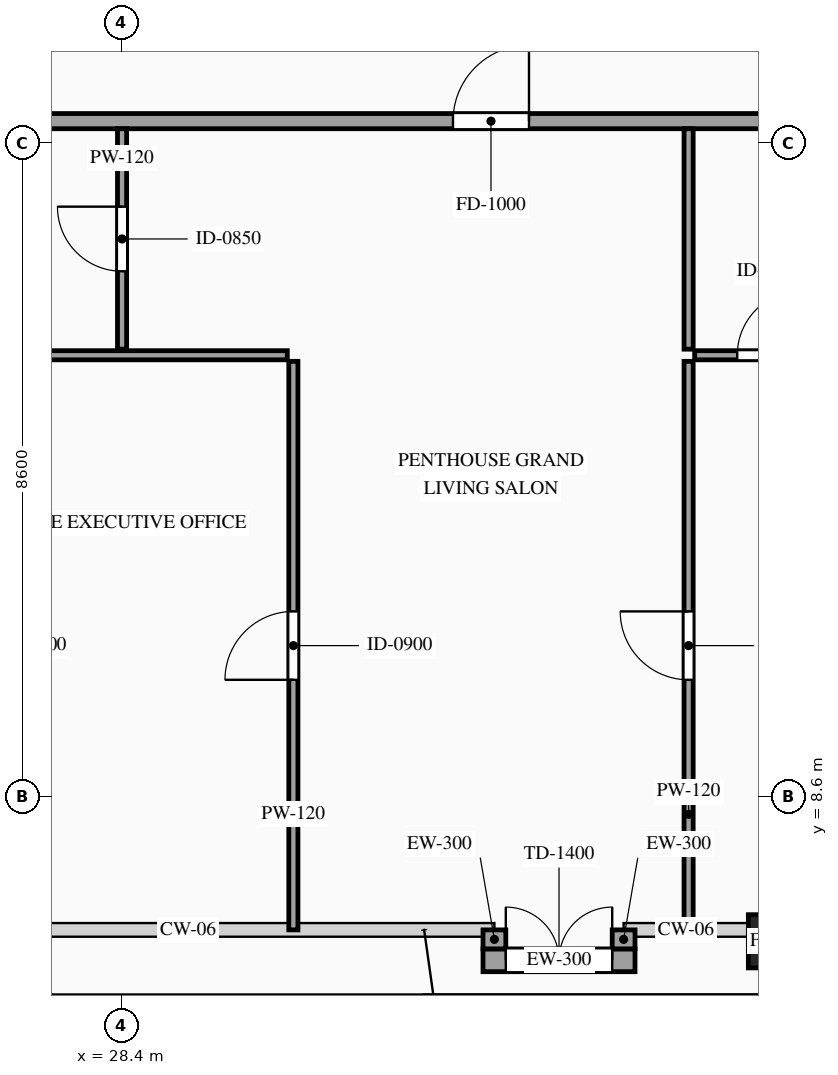
"""IFC4 building model, lengths in metres.
Left out: names, types, materials, properties, quantities, classifications, styles, units other than length and angle.
Written with IfcOpenShell. Run it as: python <this file> out.ifc"""

import sys

from ifc_helpers import new_model, si_unit, direction, frame, frame_2d, origin, origin_2d, place, context, subcontext, project, spatial, rectangle, hollow_rectangle, extrude, source, transform, mapped, element, fill, save


model = new_model("IFC4")
c1 = context("Model", 3, precision=1e-05, world=origin(), true_north=direction((0.0, 1.0)))
c2 = subcontext(c1, "Body", "Model", "MODEL_VIEW")
j1 = project(units=[si_unit("LENGTHUNIT", "METRE"), si_unit("PLANEANGLEUNIT", "RADIAN")], contexts=[c1])
p1 = place(None, origin())
s1 = spatial("IfcSite", under=j1, at=p1, CompositionType="ELEMENT")
p2 = place(p1, origin())
s2 = spatial("IfcBuilding", under=s1, at=p2, CompositionType="ELEMENT")
p3 = place(p2, frame((0.0, 0.0, 343.2)))
s3 = spatial("IfcBuildingStorey", under=s2, at=p3, CompositionType="ELEMENT", Elevation=343.2)
m1 = source(origin(), c2, "Body", "SweptSolid", [
    extrude(hollow_rectangle(XDim=0.7, YDim=0.7, WallThickness=0.032, at=origin_2d()), origin(), (0.0, 0.0, 1.0), 4.0),
])
p4 = place(p3, frame((37.0, 6.7, 0.0), z_axis=(0.0, 0.0, 1.0), x_axis=(1.0, 0.0, 0.0)))
e1 = element("IfcColumn", 1, at=p4, inside=s3, PredefinedType="COLUMN", context=c2, shape_type="MappedRepresentation", body=[
    mapped(m1, transform((0.0, 0.0, 0.0), scale=1.0)),
])
p5 = place(p3, frame((33.159, 6.45, 0.0), z_axis=(0.0, 0.0, 1.0), x_axis=(1.0, 0.0, 0.0)))
e2 = element("IfcWall", 2, at=p5, inside=s3, PredefinedType="SOLIDWALL", context=c2, shape_type="SweptSolid", body=[
    extrude(rectangle(XDim=2.0, YDim=0.3, at=frame_2d((1.0, 0.0))), origin(), (0.0, 0.0, 1.0), 3.365),
])
p6 = place(p5, frame((0.3, 0.0, 0.0)))
e3 = element("IfcOpeningElement", 3, at=p6, cuts=e2, PredefinedType="OPENING", context=c2, shape_type="SweptSolid", body=[
    extrude(rectangle(XDim=1.4, YDim=2.3, at=frame_2d((0.7, 1.15))), frame((0.0, 0.165, 0.0), z_axis=(0.0, -1.0, 0.0), x_axis=(1.0, 0.0, 0.0)), (0.0, 0.0, 1.0), 0.33),
])
m2 = source(origin(), c2, "Body", "SweptSolid", [
    extrude(rectangle(XDim=0.25, YDim=0.3, at=frame_2d((0.125, 0.0))), origin(), (0.0, 0.0, 1.0), 3.76),
])
for number, where, z_axis, x_axis in (
    (4, (33.309, 6.85, 0.0), (0.0, 0.0, 1.0), (0.0, -1.0, 0.0)),
    (5, (35.009, 6.6, 0.0), (0.0, 0.0, 1.0), (0.0, 1.0, 0.0)),
):
    element("IfcWall", number, at=place(p3, frame(where, z_axis=z_axis, x_axis=x_axis)), inside=s3, PredefinedType="SOLIDWALL", context=c2, shape_type="MappedRepresentation", body=[
        mapped(m2, transform((0.0, 0.0, 0.0), scale=1.0)),
    ])
p7 = place(p3, frame((20.94, 17.49, 0.0), z_axis=(0.0, 0.0, 1.0), x_axis=(1.0, 0.0, 0.0)))
e6 = element("IfcWall", 6, at=p7, inside=s3, PredefinedType="PARTITIONING", context=c2, shape_type="SweptSolid", body=[
    extrude(rectangle(XDim=19.834, YDim=0.2, at=frame_2d((9.917, 0.0))), origin(), (0.0, 0.0, 1.0), 3.76),
])
p8 = place(p7, frame((11.824, 0.0, 0.0)))
e7 = element("IfcOpeningElement", 7, at=p8, cuts=e6, PredefinedType="OPENING", context=c2, shape_type="SweptSolid", body=[
    extrude(rectangle(XDim=1.0, YDim=2.2, at=frame_2d((0.5, 1.1))), frame((0.0, 0.115, 0.0), z_axis=(0.0, -1.0, 0.0), x_axis=(1.0, 0.0, 0.0)), (0.0, 0.0, 1.0), 0.23),
])
p9 = place(p3, frame((28.41, 14.49, 0.0), z_axis=(0.0, 0.0, 1.0), x_axis=(0.0, 1.0, 0.0)))
e8 = element("IfcWall", 8, at=p9, inside=s3, PredefinedType="PARTITIONING", context=c2, shape_type="SweptSolid", body=[
    extrude(rectangle(XDim=2.9, YDim=0.12, at=frame_2d((1.45, 0.0))), origin(), (0.0, 0.0, 1.0), 3.76),
])
p10 = place(p9, frame((1.025, 0.0, 0.0)))
e9 = element("IfcOpeningElement", 9, at=p10, cuts=e8, PredefinedType="OPENING", context=c2, shape_type="SweptSolid", body=[
    extrude(rectangle(XDim=0.85, YDim=2.1, at=frame_2d((0.425, 1.05))), frame((0.0, 0.075, 0.0), z_axis=(0.0, -1.0, 0.0), x_axis=(1.0, 0.0, 0.0)), (0.0, 0.0, 1.0), 0.15),
])
m3 = source(origin(), c2, "Body", "SweptSolid", [
    extrude(rectangle(XDim=2.9, YDim=0.12, at=frame_2d((1.45, 0.0))), origin(), (0.0, 0.0, 1.0), 3.76),
])
p11 = place(p3, frame((35.864, 14.49, 0.0), z_axis=(0.0, 0.0, 1.0), x_axis=(0.0, 1.0, 0.0)))
e10 = element("IfcWall", 10, at=p11, inside=s3, PredefinedType="PARTITIONING", context=c2, shape_type="MappedRepresentation", body=[
    mapped(m3, transform((0.0, 0.0, 0.0), scale=1.0)),
])
p12 = place(p3, frame((35.944, 14.41, 0.0), z_axis=(0.0, 0.0, 1.0), x_axis=(1.0, 0.0, 0.0)))
e11 = element("IfcWall", 11, at=p12, inside=s3, PredefinedType="PARTITIONING", context=c2, shape_type="SweptSolid", body=[
    extrude(rectangle(XDim=4.83, YDim=0.12, at=frame_2d((2.415, 0.0))), origin(), (0.0, 0.0, 1.0), 3.76),
])
p13 = place(p12, frame((3.055, 0.0, 0.0)))
e12 = element("IfcOpeningElement", 12, at=p13, cuts=e11, PredefinedType="OPENING", context=c2, shape_type="SweptSolid", body=[
    extrude(rectangle(XDim=0.85, YDim=2.1, at=frame_2d((0.425, 1.05))), frame((0.0, 0.075, 0.0), z_axis=(0.0, -1.0, 0.0), x_axis=(1.0, 0.0, 0.0)), (0.0, 0.0, 1.0), 0.15),
])
p14 = place(p12, frame((0.56, 0.0, 0.0)))
e13 = element("IfcOpeningElement", 13, at=p14, cuts=e11, PredefinedType="OPENING", context=c2, shape_type="SweptSolid", body=[
    extrude(rectangle(XDim=0.85, YDim=2.1, at=frame_2d((0.425, 1.05))), frame((0.0, 0.075, 0.0), z_axis=(0.0, -1.0, 0.0), x_axis=(1.0, 0.0, 0.0)), (0.0, 0.0, 1.0), 0.15),
])
p15 = place(p3, frame((35.864, 6.85, 0.0), z_axis=(0.0, 0.0, 1.0), x_axis=(0.0, 1.0, 0.0)))
e14 = element("IfcWall", 14, at=p15, inside=s3, PredefinedType="PARTITIONING", context=c2, shape_type="SweptSolid", body=[
    extrude(rectangle(XDim=7.48, YDim=0.12, at=frame_2d((3.74, 0.0))), origin(), (0.0, 0.0, 1.0), 3.76),
])
p16 = place(p15, frame((3.29, 0.0, 0.0)))
e15 = element("IfcOpeningElement", 15, at=p16, cuts=e14, PredefinedType="OPENING", context=c2, shape_type="SweptSolid", body=[
    extrude(rectangle(XDim=0.9, YDim=2.15, at=frame_2d((0.45, 1.075))), frame((0.0, 0.075, 0.0), z_axis=(0.0, -1.0, 0.0), x_axis=(1.0, 0.0, 0.0)), (0.0, 0.0, 1.0), 0.15),
])
m4 = source(origin(), c2, "Body", "SweptSolid", [
    extrude(rectangle(XDim=4.654, YDim=0.12, at=frame_2d((2.327, 0.0))), origin(), (0.0, 0.0, 1.0), 3.76),
])
p17 = place(p3, frame((25.93, 14.41, 0.0), z_axis=(0.0, 0.0, 1.0), x_axis=(1.0, 0.0, 0.0)))
e16 = element("IfcWall", 16, at=p17, inside=s3, PredefinedType="PARTITIONING", context=c2, shape_type="MappedRepresentation", body=[
    mapped(m4, transform((0.0, 0.0, 0.0), scale=1.0)),
])
p18 = place(p3, frame((30.664, 6.85, 0.0), z_axis=(0.0, 0.0, 1.0), x_axis=(0.0, 1.0, 0.0)))
e17 = element("IfcWall", 17, at=p18, inside=s3, PredefinedType="PARTITIONING", context=c2, shape_type="SweptSolid", body=[
    extrude(rectangle(XDim=7.48, YDim=0.12, at=frame_2d((3.74, 0.0))), origin(), (0.0, 0.0, 1.0), 3.76),
])
p19 = place(p18, frame((3.29, 0.0, 0.0)))
e18 = element("IfcOpeningElement", 18, at=p19, cuts=e17, PredefinedType="OPENING", context=c2, shape_type="SweptSolid", body=[
    extrude(rectangle(XDim=0.9, YDim=2.15, at=frame_2d((0.45, 1.075))), frame((0.0, 0.075, 0.0), z_axis=(0.0, -1.0, 0.0), x_axis=(1.0, 0.0, 0.0)), (0.0, 0.0, 1.0), 0.15),
])
m5 = source(origin(), c2, "Body", "SweptSolid", [
    extrude(rectangle(XDim=1.4, YDim=2.3, at=frame_2d((0.7, 1.15))), frame((0.0, 0.025, 0.0), z_axis=(0.0, -1.0, 0.0), x_axis=(1.0, 0.0, 0.0)), (0.0, 0.0, 1.0), 0.05),
])
p20 = place(p6, origin())
e19 = element("IfcDoor", 19, at=p20, inside=s3, OperationType="DOUBLE_DOOR_SINGLE_SWING", PredefinedType="DOOR", context=c2, shape_type="MappedRepresentation", body=[
    mapped(m5, transform((0.0, 0.0, 0.0), scale=1.0)),
])
fill(e3, e19)
m6 = source(origin(), c2, "Body", "SweptSolid", [
    extrude(rectangle(XDim=1.0, YDim=2.2, at=frame_2d((0.5, 1.1))), frame((0.0, 0.025, 0.0), z_axis=(0.0, -1.0, 0.0), x_axis=(1.0, 0.0, 0.0)), (0.0, 0.0, 1.0), 0.05),
])
p21 = place(p8, origin())
e20 = element("IfcDoor", 20, at=p21, inside=s3, OperationType="SINGLE_SWING_RIGHT", PredefinedType="DOOR", context=c2, shape_type="MappedRepresentation", body=[
    mapped(m6, transform((0.0, 0.0, 0.0), scale=1.0)),
])
fill(e7, e20)
m7 = source(origin(), c2, "Body", "SweptSolid", [
    extrude(rectangle(XDim=0.85, YDim=2.1, at=frame_2d((0.425, 1.05))), frame((0.0, 0.025, 0.0), z_axis=(0.0, -1.0, 0.0), x_axis=(1.0, 0.0, 0.0)), (0.0, 0.0, 1.0), 0.05),
])
p22 = place(p10, origin())
e21 = element("IfcDoor", 21, at=p22, inside=s3, OperationType="SINGLE_SWING_RIGHT", PredefinedType="DOOR", context=c2, shape_type="MappedRepresentation", body=[
    mapped(m7, transform((0.0, 0.0, 0.0), scale=1.0)),
])
fill(e9, e21)
p23 = place(p14, origin())
e22 = element("IfcDoor", 22, at=p23, inside=s3, OperationType="SINGLE_SWING_RIGHT", PredefinedType="DOOR", context=c2, shape_type="MappedRepresentation", body=[
    mapped(m7, transform((0.0, 0.0, 0.0), scale=1.0)),
])
fill(e13, e22)
m8 = source(origin(), c2, "Body", "SweptSolid", [
    extrude(rectangle(XDim=0.9, YDim=2.15, at=frame_2d((0.45, 1.075))), frame((0.0, 0.025, 0.0), z_axis=(0.0, -1.0, 0.0), x_axis=(1.0, 0.0, 0.0)), (0.0, 0.0, 1.0), 0.05),
])
p24 = place(p16, origin())
e23 = element("IfcDoor", 23, at=p24, inside=s3, OperationType="SINGLE_SWING_RIGHT", PredefinedType="DOOR", context=c2, shape_type="MappedRepresentation", body=[
    mapped(m8, transform((0.0, 0.0, 0.0), scale=1.0)),
])
fill(e15, e23)
p25 = place(p19, origin())
e24 = element("IfcDoor", 24, at=p25, inside=s3, OperationType="SINGLE_SWING_LEFT", PredefinedType="DOOR", context=c2, shape_type="MappedRepresentation", body=[
    mapped(m8, transform((0.0, 0.0, 0.0), scale=1.0)),
])
fill(e18, e24)
save(model, sys.argv[1])
